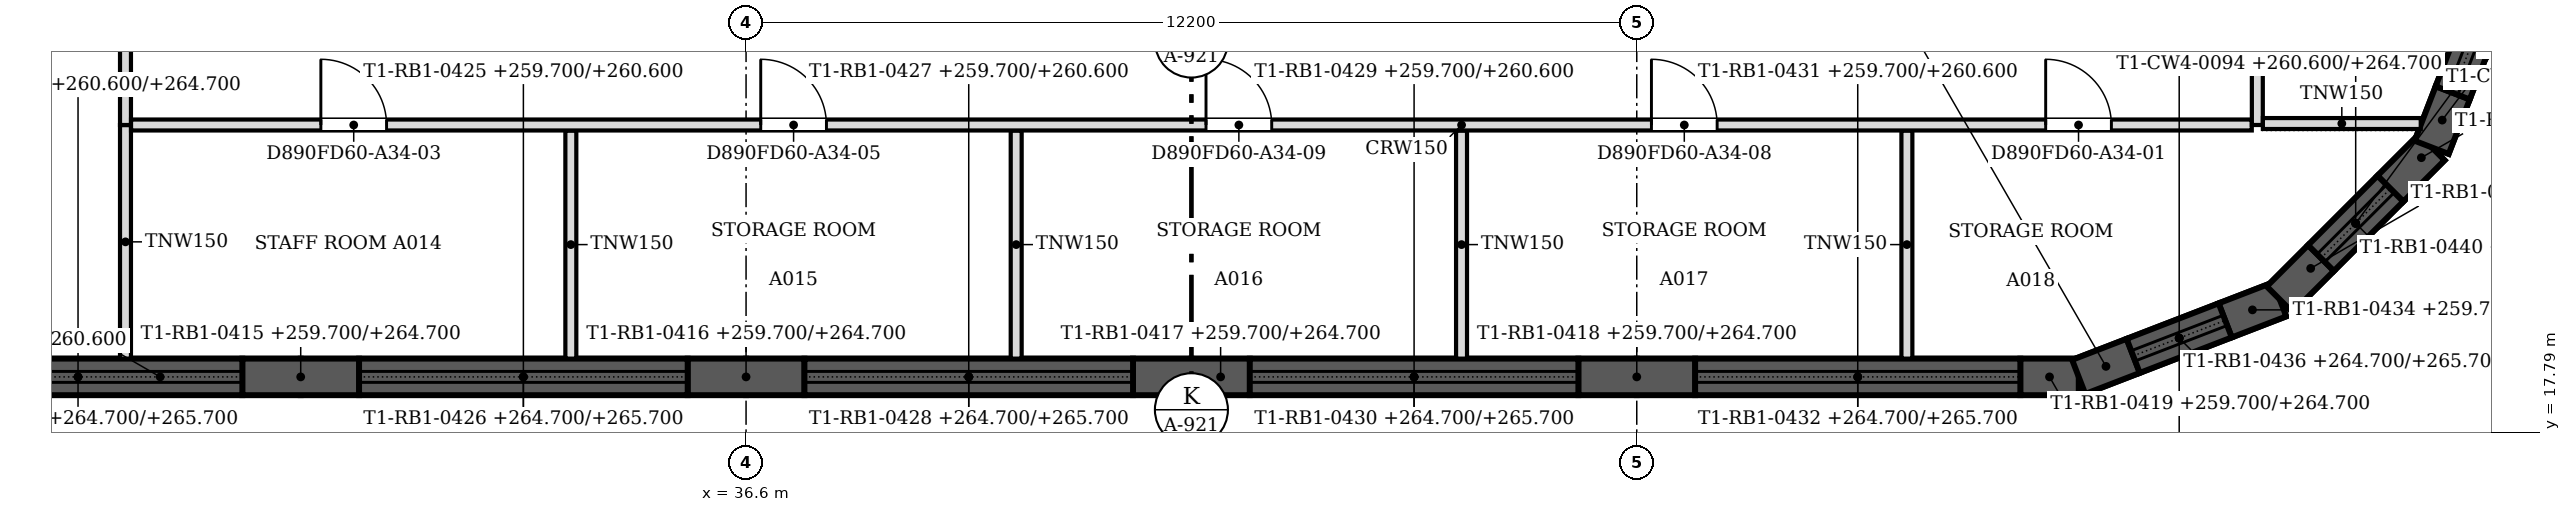
"""IFC4 building model, lengths in metres.
Left out: names, types, materials, properties, quantities, classifications, styles, units other than length and angle.
Written with IfcOpenShell. Run it as: python <this file> out.ifc"""

import sys

from ifc_helpers import new_model, si_unit, direction, frame, frame_2d, origin, place, context, subcontext, project, spatial, polyline, rectangle, outline, extrude, faceted_brep, source, transform, mapped, element, fill, save


model = new_model("IFC4")
c1 = context("Model", 3, precision=1e-05, world=origin(), true_north=direction((0.0, 1.0)))
c2 = subcontext(c1, "Body", "Model", "MODEL_VIEW")
j1 = project(units=[si_unit("LENGTHUNIT", "METRE"), si_unit("PLANEANGLEUNIT", "RADIAN")], contexts=[c1])
p1 = place(None, origin())
s1 = spatial("IfcSite", under=j1, at=p1, CompositionType="ELEMENT")
p2 = place(p1, origin())
s2 = spatial("IfcBuilding", under=s1, at=p2, CompositionType="ELEMENT")
p3 = place(p2, frame((0.0, 0.0, 259.7)))
s3 = spatial("IfcBuildingStorey", under=s2, at=p3, CompositionType="ELEMENT", Elevation=259.7)
m1 = source(origin(), c2, "Body", "SweptSolid", [
    extrude(outline(polyline([(0.0, 0.0), (1.6, 0.0), (1.6, 5.0), (0.0, 5.0), (0.0, 0.0)])), frame((0.0, 0.25, 0.0), z_axis=(0.0, -1.0, 0.0), x_axis=(1.0, 0.0, 0.0)), (0.0, 0.0, 1.0), 0.5),
])
p4 = place(p3, frame((29.7, 18.55, 0.0), z_axis=(0.0, 0.0, 1.0), x_axis=(1.0, 0.0, 0.0)))
e1 = element("IfcWall", 1, at=p4, inside=s3, PredefinedType="SOLIDWALL", context=c2, shape_type="MappedRepresentation", body=[
    mapped(m1, transform((0.0, 0.0, 0.0), scale=1.0)),
])
m2 = source(origin(), c2, "Body", "Brep", [
    faceted_brep([(0.0, -0.25, 0.0), (1.6, -0.25, 0.0), (1.6, -0.25, 5.0), (0.0, -0.25, 5.0), (0.0, 0.25, 5.0), (1.6, 0.25, 5.0), (1.6, 0.25, 0.0), (0.0, 0.25, 0.0)], [[[0, 1, 2, 3]], [[4, 5, 6, 7]], [[7, 6, 1, 0]], [[5, 4, 3, 2]], [[4, 7, 0, 3]], [[1, 6, 5, 2]]]),
])
p5 = place(p3, frame((35.8, 18.55, 0.0), z_axis=(0.0, 0.0, 1.0), x_axis=(1.0, 0.0, 0.0)))
e2 = element("IfcWall", 2, at=p5, inside=s3, PredefinedType="SOLIDWALL", context=c2, shape_type="MappedRepresentation", body=[
    mapped(m2, transform((0.0, 0.0, 0.0), scale=1.0)),
])
for number, where, z_axis, x_axis in (
    (3, (41.9, 18.55, 0.0), (0.0, 0.0, 1.0), (1.0, 0.0, 0.0)),
    (4, (48.0, 18.55, 0.0), (0.0, 0.0, 1.0), (1.0, 0.0, 0.0)),
):
    element("IfcWall", number, at=place(p3, frame(where, z_axis=z_axis, x_axis=x_axis)), inside=s3, PredefinedType="SOLIDWALL", context=c2, shape_type="MappedRepresentation", body=[
        mapped(m1, transform((0.0, 0.0, 0.0), scale=1.0)),
    ])
m3 = source(origin(), c2, "Body", "Brep", [
    faceted_brep([(0.0, -0.25, 0.0), (0.8, -0.25, 0.0), (0.8, -0.25, 5.0), (0.0, -0.25, 5.0), (0.0, 0.25, 5.0), (0.753, 0.25, 5.0), (0.753, 0.25, 0.0), (0.0, 0.25, 0.0), (0.8, -0.0, 0.0), (0.8, -0.0, 5.0)], [[[0, 1, 2, 3]], [[4, 5, 6, 7]], [[7, 6, 8, 1, 0]], [[9, 2, 1, 8]], [[5, 4, 3, 2, 9]], [[4, 7, 0, 3]], [[8, 6, 5, 9]]]),
])
p6 = place(p3, frame((54.053, 18.55, 0.0), z_axis=(0.0, 0.0, 1.0), x_axis=(1.0, 0.0, 0.0)))
e5 = element("IfcWall", 5, at=p6, inside=s3, PredefinedType="SOLIDWALL", context=c2, shape_type="MappedRepresentation", body=[
    mapped(m3, transform((0.0, 0.0, 0.0), scale=1.0)),
])
m4 = source(origin(), c2, "Body", "SweptSolid", [
    extrude(outline(polyline([(0.0, 0.0), (4.5, 0.0), (4.5, 0.9), (0.0, 0.9), (0.0, 0.0)])), frame((0.0, 0.25, 0.0), z_axis=(0.0, -1.0, 0.0), x_axis=(1.0, 0.0, 0.0)), (0.0, 0.0, 1.0), 0.5),
])
p7 = place(p3, frame((25.2, 18.55, 0.0), z_axis=(0.0, 0.0, 1.0), x_axis=(1.0, 0.0, 0.0)))
e6 = element("IfcWall", 6, at=p7, inside=s3, PredefinedType="SOLIDWALL", context=c2, shape_type="MappedRepresentation", body=[
    mapped(m4, transform((0.0, 0.0, 0.0), scale=1.0)),
])
m5 = source(origin(), c2, "Body", "SweptSolid", [
    extrude(outline(polyline([(0.0, 0.0), (6.1, 0.0), (6.1, 1.0), (0.0, 1.0), (0.0, 0.0)])), frame((0.0, 0.25, 0.0), z_axis=(0.0, -1.0, 0.0), x_axis=(1.0, 0.0, 0.0)), (0.0, 0.0, 1.0), 0.5),
])
p8 = place(p3, frame((24.4, 18.55, 5.0), z_axis=(0.0, 0.0, 1.0), x_axis=(1.0, 0.0, 0.0)))
e7 = element("IfcWall", 7, at=p8, inside=s3, PredefinedType="SOLIDWALL", context=c2, shape_type="MappedRepresentation", body=[
    mapped(m5, transform((0.0, 0.0, 0.0), scale=1.0)),
])
p9 = place(p3, frame((31.3, 18.55, 0.0), z_axis=(0.0, 0.0, 1.0), x_axis=(1.0, 0.0, 0.0)))
e8 = element("IfcWall", 8, at=p9, inside=s3, PredefinedType="SOLIDWALL", context=c2, shape_type="MappedRepresentation", body=[
    mapped(m4, transform((0.0, 0.0, 0.0), scale=1.0)),
])
p10 = place(p3, frame((30.5, 18.55, 5.0), z_axis=(0.0, 0.0, 1.0), x_axis=(1.0, 0.0, 0.0)))
e9 = element("IfcWall", 9, at=p10, inside=s3, PredefinedType="SOLIDWALL", context=c2, shape_type="MappedRepresentation", body=[
    mapped(m5, transform((0.0, 0.0, 0.0), scale=1.0)),
])
p11 = place(p3, frame((37.4, 18.55, 0.0), z_axis=(0.0, 0.0, 1.0), x_axis=(1.0, 0.0, 0.0)))
e10 = element("IfcWall", 10, at=p11, inside=s3, PredefinedType="SOLIDWALL", context=c2, shape_type="MappedRepresentation", body=[
    mapped(m4, transform((0.0, 0.0, 0.0), scale=1.0)),
])
m6 = source(origin(), c2, "Body", "Brep", [
    faceted_brep([(0.0, -0.25, 0.0), (6.1, -0.25, 0.0), (6.1, -0.25, 1.0), (0.0, -0.25, 1.0), (0.0, 0.25, 1.0), (6.1, 0.25, 1.0), (6.1, 0.25, 0.0), (0.0, 0.25, 0.0)], [[[0, 1, 2, 3]], [[4, 5, 6, 7]], [[7, 6, 1, 0]], [[5, 4, 3, 2]], [[4, 7, 0, 3]], [[1, 6, 5, 2]]]),
])
p12 = place(p3, frame((36.6, 18.55, 5.0), z_axis=(0.0, 0.0, 1.0), x_axis=(1.0, 0.0, 0.0)))
e11 = element("IfcWall", 11, at=p12, inside=s3, PredefinedType="SOLIDWALL", context=c2, shape_type="MappedRepresentation", body=[
    mapped(m6, transform((0.0, 0.0, 0.0), scale=1.0)),
])
p13 = place(p3, frame((43.5, 18.55, 0.0), z_axis=(0.0, 0.0, 1.0), x_axis=(1.0, 0.0, 0.0)))
e12 = element("IfcWall", 12, at=p13, inside=s3, PredefinedType="SOLIDWALL", context=c2, shape_type="MappedRepresentation", body=[
    mapped(m4, transform((0.0, 0.0, 0.0), scale=1.0)),
])
p14 = place(p3, frame((42.7, 18.55, 5.0), z_axis=(0.0, 0.0, 1.0), x_axis=(1.0, 0.0, 0.0)))
e13 = element("IfcWall", 13, at=p14, inside=s3, PredefinedType="SOLIDWALL", context=c2, shape_type="MappedRepresentation", body=[
    mapped(m5, transform((0.0, 0.0, 0.0), scale=1.0)),
])
m7 = source(origin(), c2, "Body", "SweptSolid", [
    extrude(outline(polyline([(0.0, 0.0), (4.453, 0.0), (4.453, 0.9), (0.0, 0.9), (0.0, 0.0)])), frame((0.0, 0.25, 0.0), z_axis=(0.0, -1.0, 0.0), x_axis=(1.0, 0.0, 0.0)), (0.0, 0.0, 1.0), 0.5),
])
p15 = place(p3, frame((49.6, 18.55, 0.0), z_axis=(0.0, 0.0, 1.0), x_axis=(1.0, 0.0, 0.0)))
e14 = element("IfcWall", 14, at=p15, inside=s3, PredefinedType="SOLIDWALL", context=c2, shape_type="MappedRepresentation", body=[
    mapped(m7, transform((0.0, 0.0, 0.0), scale=1.0)),
])
m8 = source(origin(), c2, "Body", "Brep", [
    faceted_brep([(0.0, -0.25, 0.0), (6.053, -0.25, 0.0), (6.053, -0.25, 1.0), (0.0, -0.25, 1.0), (0.0, 0.25, 1.0), (6.007, 0.25, 1.0), (6.007, 0.25, 0.0), (0.0, 0.25, 0.0), (6.053, 0.0, 0.0), (6.053, 0.0, 1.0)], [[[0, 1, 2, 3]], [[4, 5, 6, 7]], [[7, 6, 8, 1, 0]], [[9, 2, 1, 8]], [[5, 4, 3, 2, 9]], [[4, 7, 0, 3]], [[8, 6, 5, 9]]]),
])
p16 = place(p3, frame((48.8, 18.55, 5.0), z_axis=(0.0, 0.0, 1.0), x_axis=(1.0, 0.0, 0.0)))
e15 = element("IfcWall", 15, at=p16, inside=s3, PredefinedType="SOLIDWALL", context=c2, shape_type="MappedRepresentation", body=[
    mapped(m8, transform((0.0, 0.0, 0.0), scale=1.0)),
])
m9 = source(origin(), c2, "Body", "Brep", [
    faceted_brep([(0.0, -0.25, 0.0), (0.8, -0.25, 0.0), (0.8, -0.25, 5.0), (0.0, -0.25, 5.0), (0.047, 0.25, 5.0), (0.8, 0.25, 5.0), (0.8, 0.25, 0.0), (0.047, 0.25, 0.0), (0.0, 0.0, 0.0), (0.0, 0.0, 5.0)], [[[0, 1, 2, 3]], [[4, 5, 6, 7]], [[7, 6, 1, 0, 8]], [[5, 4, 9, 3, 2]], [[8, 0, 3, 9]], [[7, 8, 9, 4]], [[1, 6, 5, 2]]]),
])
p17 = place(p3, frame((54.854, 18.55, 0.0), z_axis=(0.0, 0.0, 1.0), x_axis=(0.93301483327, 0.3598379092, 0.0)))
e16 = element("IfcWall", 16, at=p17, inside=s3, PredefinedType="SOLIDWALL", context=c2, shape_type="MappedRepresentation", body=[
    mapped(m9, transform((0.0, 0.0, 0.0), scale=1.0)),
])
m10 = source(origin(), c2, "Body", "Brep", [
    faceted_brep([(0.0, -0.25, 0.0), (0.8, -0.25, 0.0), (0.8, -0.25, 5.0), (0.0, -0.25, 5.0), (0.0, 0.25, 5.0), (0.747, 0.25, 5.0), (0.747, 0.25, 0.0), (0.0, 0.25, 0.0), (0.8, -0.0, 0.0), (0.8, -0.0, 5.0)], [[[0, 1, 2, 3]], [[4, 5, 6, 7]], [[7, 6, 8, 1, 0]], [[9, 2, 1, 8]], [[5, 4, 3, 2, 9]], [[4, 7, 0, 3]], [[8, 6, 5, 9]]]),
])
p18 = place(p3, frame((56.86, 19.324, 0.0), z_axis=(0.0, 0.0, 1.0), x_axis=(0.93301483327, 0.3598379092, 0.0)))
e17 = element("IfcWall", 17, at=p18, inside=s3, PredefinedType="SOLIDWALL", context=c2, shape_type="MappedRepresentation", body=[
    mapped(m10, transform((0.0, 0.0, 0.0), scale=1.0)),
])
m11 = source(origin(), c2, "Body", "SweptSolid", [
    extrude(outline(polyline([(0.0, 0.0), (1.351, 0.0), (1.351, 0.9), (0.0, 0.9), (0.0, 0.0)])), frame((0.0, 0.25, 0.0), z_axis=(0.0, -1.0, 0.0), x_axis=(1.0, 0.0, 0.0)), (0.0, 0.0, 1.0), 0.5),
])
p19 = place(p3, frame((55.6, 18.838, 0.0), z_axis=(0.0, 0.0, 1.0), x_axis=(0.932981713512, 0.359923772835, 0.0)))
e18 = element("IfcWall", 18, at=p19, inside=s3, PredefinedType="SOLIDWALL", context=c2, shape_type="MappedRepresentation", body=[
    mapped(m11, transform((0.0, 0.0, 0.0), scale=1.0)),
])
m12 = source(origin(), c2, "Body", "Brep", [
    faceted_brep([(0.0, -0.25, 0.0), (2.95, -0.25, 0.0), (2.95, -0.25, 1.0), (0.0, -0.25, 1.0), (0.047, 0.25, 1.0), (2.898, 0.25, 1.0), (2.898, 0.25, 0.0), (0.047, 0.25, 0.0), (2.95, 0.0, 0.0), (0.0, 0.0, 0.0), (2.95, 0.0, 1.0), (0.0, 0.0, 1.0)], [[[0, 1, 2, 3]], [[4, 5, 6, 7]], [[7, 6, 8, 1, 0, 9]], [[10, 2, 1, 8]], [[5, 4, 11, 3, 2, 10]], [[9, 0, 3, 11]], [[7, 9, 11, 4]], [[8, 6, 5, 10]]]),
])
p20 = place(p3, frame((54.854, 18.55, 5.0), z_axis=(0.0, 0.0, 1.0), x_axis=(0.932999673775, 0.359877213415, 0.0)))
e19 = element("IfcWall", 19, at=p20, inside=s3, PredefinedType="SOLIDWALL", context=c2, shape_type="MappedRepresentation", body=[
    mapped(m12, transform((0.0, 0.0, 0.0), scale=1.0)),
])
m13 = source(origin(), c2, "Body", "Brep", [
    faceted_brep([(0.0, -0.25, 0.0), (0.8, -0.25, 0.0), (0.8, -0.25, 5.0), (0.0, -0.25, 5.0), (0.053, 0.25, 5.0), (0.8, 0.25, 5.0), (0.8, 0.25, 0.0), (0.053, 0.25, 0.0), (0.0, 0.0, 0.0), (0.0, 0.0, 5.0)], [[[0, 1, 2, 3]], [[4, 5, 6, 7]], [[7, 6, 1, 0, 8]], [[5, 4, 9, 3, 2]], [[8, 0, 3, 9]], [[7, 8, 9, 4]], [[1, 6, 5, 2]]]),
])
p21 = place(p3, frame((57.606, 19.612, 0.0), z_axis=(0.0, 0.0, 1.0), x_axis=(0.706954206636, 0.707259322823, 0.0)))
e20 = element("IfcWall", 20, at=p21, inside=s3, PredefinedType="SOLIDWALL", context=c2, shape_type="MappedRepresentation", body=[
    mapped(m13, transform((0.0, 0.0, 0.0), scale=1.0)),
])
m14 = source(origin(), c2, "Body", "Brep", [
    faceted_brep([(0.0, -0.25, 0.0), (0.8, -0.25, 0.0), (0.8, -0.25, 5.0), (0.0, -0.25, 5.0), (0.0, 0.25, 5.0), (0.747, 0.25, 5.0), (0.747, 0.25, 0.0), (0.0, 0.25, 0.0), (0.8, -0.0, 0.0), (0.8, -0.0, 5.0)], [[[0, 1, 2, 3]], [[4, 5, 6, 7]], [[7, 6, 8, 1, 0]], [[9, 2, 1, 8]], [[5, 4, 3, 2, 9]], [[4, 7, 0, 3]], [[8, 6, 5, 9]]]),
])
p22 = place(p3, frame((59.122, 21.128, 0.0), z_axis=(0.0, 0.0, 1.0), x_axis=(0.707106781187, 0.707106781187, 0.0)))
e21 = element("IfcWall", 21, at=p22, inside=s3, PredefinedType="SOLIDWALL", context=c2, shape_type="MappedRepresentation", body=[
    mapped(m14, transform((0.0, 0.0, 0.0), scale=1.0)),
])
m15 = source(origin(), c2, "Body", "SweptSolid", [
    extrude(outline(polyline([(0.0, 0.0), (1.344, 0.0), (1.344, 0.9), (0.0, 0.9), (0.0, 0.0)])), frame((0.0, 0.25, 0.0), z_axis=(0.0, -1.0, 0.0), x_axis=(1.0, 0.0, 0.0)), (0.0, 0.0, 1.0), 0.5),
])
p23 = place(p3, frame((58.172, 20.177, 0.0), z_axis=(0.0, 0.0, 1.0), x_axis=(0.707106781187, 0.707106781187, 0.0)))
e22 = element("IfcWall", 22, at=p23, inside=s3, PredefinedType="SOLIDWALL", context=c2, shape_type="MappedRepresentation", body=[
    mapped(m15, transform((0.0, 0.0, 0.0), scale=1.0)),
])
m16 = source(origin(), c2, "Body", "Brep", [
    faceted_brep([(0.0, -0.25, 0.0), (2.944, -0.25, 0.0), (2.944, -0.25, 1.0), (0.0, -0.25, 1.0), (0.053, 0.25, 1.0), (2.891, 0.25, 1.0), (2.891, 0.25, 0.0), (0.053, 0.25, 0.0), (2.944, 0.0, 0.0), (0.0, 0.0, 0.0), (2.944, 0.0, 1.0), (0.0, 0.0, 1.0)], [[[0, 1, 2, 3]], [[4, 5, 6, 7]], [[7, 6, 8, 1, 0, 9]], [[10, 2, 1, 8]], [[5, 4, 11, 3, 2, 10]], [[9, 0, 3, 11]], [[7, 9, 11, 4]], [[8, 6, 5, 10]]]),
])
p24 = place(p3, frame((57.606, 19.612, 5.0), z_axis=(0.0, 0.0, 1.0), x_axis=(0.707106781187, 0.707106781187, 0.0)))
e23 = element("IfcWall", 23, at=p24, inside=s3, PredefinedType="SOLIDWALL", context=c2, shape_type="MappedRepresentation", body=[
    mapped(m16, transform((0.0, 0.0, 0.0), scale=1.0)),
])
p25 = place(p3, frame((59.688, 21.694, 0.0), z_axis=(0.0, 0.0, 1.0), x_axis=(0.360103552367, 0.932912338632, 0.0)))
e24 = element("IfcWall", 24, at=p25, inside=s3, PredefinedType="SOLIDWALL", context=c2, shape_type="MappedRepresentation", body=[
    mapped(m13, transform((0.0, 0.0, 0.0), scale=1.0)),
])
p26 = place(p3, frame((59.976, 22.44, 0.0), z_axis=(0.0, 0.0, 1.0), x_axis=(0.359923772835, 0.932981713512, 0.0)))
e25 = element("IfcWall", 25, at=p26, inside=s3, PredefinedType="SOLIDWALL", context=c2, shape_type="MappedRepresentation", body=[
    mapped(m11, transform((0.0, 0.0, 0.0), scale=1.0)),
])
m17 = source(origin(), c2, "Body", "Brep", [
    faceted_brep([(0.0, -0.25, 0.0), (2.95, -0.25, 0.0), (2.95, -0.25, 1.0), (0.0, -0.25, 1.0), (0.053, 0.25, 1.0), (2.904, 0.25, 1.0), (2.904, 0.25, 0.0), (0.053, 0.25, 0.0), (2.95, 0.0, 0.0), (0.0, 0.0, 0.0), (2.95, 0.0, 1.0), (0.0, 0.0, 1.0)], [[[0, 1, 2, 3]], [[4, 5, 6, 7]], [[7, 6, 8, 1, 0, 9]], [[10, 2, 1, 8]], [[5, 4, 11, 3, 2, 10]], [[9, 0, 3, 11]], [[7, 9, 11, 4]], [[8, 6, 5, 10]]]),
])
p27 = place(p3, frame((59.688, 21.694, 5.0), z_axis=(0.0, 0.0, 1.0), x_axis=(0.359949242603, 0.932971887438, 0.0)))
e26 = element("IfcWall", 26, at=p27, inside=s3, PredefinedType="SOLIDWALL", context=c2, shape_type="MappedRepresentation", body=[
    mapped(m17, transform((0.0, 0.0, 0.0), scale=1.0)),
])
p28 = place(p3, frame((28.1, 18.8, 0.0), z_axis=(0.0, 0.0, 1.0), x_axis=(0.0, 1.0, 0.0)))
e27 = element("IfcWall", 27, at=p28, inside=s3, PredefinedType="PARTITIONING", context=c2, shape_type="SweptSolid", body=[
    extrude(rectangle(XDim=3.199, YDim=0.15, at=frame_2d((1.6, 0.0))), origin(), (0.0, 0.0, 1.0), 5.167),
])
for number, where, z_axis, x_axis in (
    (28, (34.2, 18.8, 0.0), (0.0, 0.0, 1.0), (0.0, 1.0, 0.0)),
    (29, (40.3, 18.8, 0.0), (0.0, 0.0, 1.0), (0.0, 1.0, 0.0)),
    (30, (46.4, 18.8, 0.0), (0.0, 0.0, 1.0), (0.0, 1.0, 0.0)),
    (31, (52.5, 18.8, 0.0), (0.0, 0.0, 1.0), (0.0, 1.0, 0.0)),
):
    element("IfcWall", number, at=place(p3, frame(where, z_axis=z_axis, x_axis=x_axis)), inside=s3, PredefinedType="PARTITIONING", context=c2, shape_type="SweptSolid", body=[
        extrude(rectangle(XDim=3.124, YDim=0.15, at=frame_2d((1.562, 0.0))), origin(), (0.0, 0.0, 1.0), 5.167),
    ])
p29 = place(p3, frame((28.1, 22.0, 0.0), z_axis=(0.0, 0.0, 1.0), x_axis=(0.0, 1.0, 0.0)))
e32 = element("IfcWall", 32, at=p29, inside=s3, PredefinedType="PARTITIONING", context=c2, shape_type="SweptSolid", body=[
    extrude(rectangle(XDim=23.224, YDim=0.15, at=frame_2d((11.612, 0.0))), origin(), (0.0, 0.0, 1.0), 5.167),
])
m18 = source(origin(), c2, "Body", "SweptSolid", [
    extrude(rectangle(XDim=1.8, YDim=2.1, at=frame_2d((0.9, 1.05))), frame((0.0, 0.085, 0.0), z_axis=(0.0, -1.0, 0.0), x_axis=(1.0, 0.0, 0.0)), (0.0, 0.0, 1.0), 0.17),
])
p30 = place(p29, frame((9.301, 0.0, 0.0)))
e33 = element("IfcOpeningElement", 33, at=p30, cuts=e32, PredefinedType="OPENING", context=c2, shape_type="MappedRepresentation", body=[
    mapped(m18, transform((0.0, 0.0, 0.0), scale=1.0)),
])
p31 = place(p29, frame((2.6, 0.0, 0.0)))
e34 = element("IfcOpeningElement", 34, at=p31, cuts=e32, PredefinedType="OPENING", context=c2, shape_type="MappedRepresentation", body=[
    mapped(m18, transform((0.0, 0.0, 0.0), scale=1.0)),
])
m19 = source(origin(), c2, "Body", "SweptSolid", [
    extrude(rectangle(XDim=1.5, YDim=2.1, at=frame_2d((0.75, 1.05))), frame((0.0, 0.085, 0.0), z_axis=(0.0, -1.0, 0.0), x_axis=(1.0, 0.0, 0.0)), (0.0, 0.0, 1.0), 0.17),
])
p32 = place(p29, frame((17.6, 0.0, 0.0)))
e35 = element("IfcOpeningElement", 35, at=p32, cuts=e32, PredefinedType="OPENING", context=c2, shape_type="MappedRepresentation", body=[
    mapped(m19, transform((0.0, 0.0, 0.0), scale=1.0)),
])
p33 = place(p3, frame((57.224, 22.0, 0.0), z_axis=(0.0, 0.0, 1.0), x_axis=(-1.0, 0.0, 0.0)))
e36 = element("IfcWall", 36, at=p33, inside=s3, PredefinedType="PARTITIONING", context=c2, shape_type="SweptSolid", body=[
    extrude(rectangle(XDim=29.048, YDim=0.15, at=frame_2d((14.524, 0.0))), origin(), (0.0, 0.0, 1.0), 5.167),
])
m20 = source(origin(), c2, "Body", "SweptSolid", [
    extrude(rectangle(XDim=0.9, YDim=2.1, at=frame_2d((0.45, 1.05))), frame((0.0, 0.085, 0.0), z_axis=(0.0, -1.0, 0.0), x_axis=(1.0, 0.0, 0.0)), (0.0, 0.0, 1.0), 0.17),
])
p34 = place(p33, frame((1.923, 0.0, 0.0)))
e37 = element("IfcOpeningElement", 37, at=p34, cuts=e36, PredefinedType="OPENING", context=c2, shape_type="MappedRepresentation", body=[
    mapped(m20, transform((0.0, 0.0, 0.0), scale=1.0)),
])
p35 = place(p33, frame((25.548, 0.0, 0.0)))
e38 = element("IfcOpeningElement", 38, at=p35, cuts=e36, PredefinedType="OPENING", context=c2, shape_type="MappedRepresentation", body=[
    mapped(m20, transform((0.0, 0.0, 0.0), scale=1.0)),
])
p36 = place(p33, frame((19.523, 0.0, 0.0)))
e39 = element("IfcOpeningElement", 39, at=p36, cuts=e36, PredefinedType="OPENING", context=c2, shape_type="MappedRepresentation", body=[
    mapped(m20, transform((0.0, 0.0, 0.0), scale=1.0)),
])
p37 = place(p33, frame((7.323, 0.0, 0.0)))
e40 = element("IfcOpeningElement", 40, at=p37, cuts=e36, PredefinedType="OPENING", context=c2, shape_type="MappedRepresentation", body=[
    mapped(m20, transform((0.0, 0.0, 0.0), scale=1.0)),
])
p38 = place(p33, frame((13.424, 0.0, 0.0)))
e41 = element("IfcOpeningElement", 41, at=p38, cuts=e36, PredefinedType="OPENING", context=c2, shape_type="MappedRepresentation", body=[
    mapped(m20, transform((0.0, 0.0, 0.0), scale=1.0)),
])
p39 = place(p3, frame((57.3, 30.6, 0.0), z_axis=(0.0, 0.0, 1.0), x_axis=(0.0, -1.0, 0.0)))
e42 = element("IfcWall", 42, at=p39, inside=s3, PredefinedType="PARTITIONING", context=c2, shape_type="SweptSolid", body=[
    extrude(rectangle(XDim=8.6, YDim=0.15, at=frame_2d((4.3, 0.0))), origin(), (0.0, 0.0, 1.0), 5.167),
])
p40 = place(p39, frame((3.9, 0.0, 0.0)))
e43 = element("IfcOpeningElement", 43, at=p40, cuts=e42, PredefinedType="OPENING", context=c2, shape_type="MappedRepresentation", body=[
    mapped(m20, transform((0.0, 0.0, 0.0), scale=1.0)),
])
p41 = place(p3, frame((57.376, 22.02, 0.0), z_axis=(0.0, 0.0, 1.0), x_axis=(1.0, 0.0, 0.0)))
e44 = element("IfcWall", 44, at=p41, inside=s3, PredefinedType="PARTITIONING", context=c2, shape_type="SweptSolid", body=[
    extrude(rectangle(XDim=2.162, YDim=0.15, at=frame_2d((1.081, 0.0))), origin(), (0.0, 0.0, 1.0), 5.167),
])
m21 = source(origin(), c2, "Body", "SweptSolid", [
    extrude(rectangle(XDim=0.9, YDim=2.1, at=frame_2d((0.45, 1.05))), frame((0.0, 0.025, 0.0), z_axis=(0.0, -1.0, 0.0), x_axis=(1.0, 0.0, 0.0)), (0.0, 0.0, 1.0), 0.05),
])
p42 = place(p34, origin())
e45 = element("IfcDoor", 45, at=p42, inside=s3, OperationType="SINGLE_SWING_RIGHT", PredefinedType="DOOR", context=c2, shape_type="MappedRepresentation", body=[
    mapped(m21, transform((0.0, 0.0, 0.0), scale=1.0)),
])
fill(e37, e45)
p43 = place(p35, origin())
e46 = element("IfcDoor", 46, at=p43, inside=s3, OperationType="SINGLE_SWING_RIGHT", PredefinedType="DOOR", context=c2, shape_type="MappedRepresentation", body=[
    mapped(m21, transform((0.0, 0.0, 0.0), scale=1.0)),
])
fill(e38, e46)
p44 = place(p36, origin())
e47 = element("IfcDoor", 47, at=p44, inside=s3, OperationType="SINGLE_SWING_RIGHT", PredefinedType="DOOR", context=c2, shape_type="MappedRepresentation", body=[
    mapped(m21, transform((0.0, 0.0, 0.0), scale=1.0)),
])
fill(e39, e47)
p45 = place(p37, origin())
e48 = element("IfcDoor", 48, at=p45, inside=s3, OperationType="SINGLE_SWING_RIGHT", PredefinedType="DOOR", context=c2, shape_type="MappedRepresentation", body=[
    mapped(m21, transform((0.0, 0.0, 0.0), scale=1.0)),
])
fill(e40, e48)
p46 = place(p38, origin())
e49 = element("IfcDoor", 49, at=p46, inside=s3, OperationType="SINGLE_SWING_RIGHT", PredefinedType="DOOR", context=c2, shape_type="MappedRepresentation", body=[
    mapped(m21, transform((0.0, 0.0, 0.0), scale=1.0)),
])
fill(e41, e49)
save(model, sys.argv[1])
